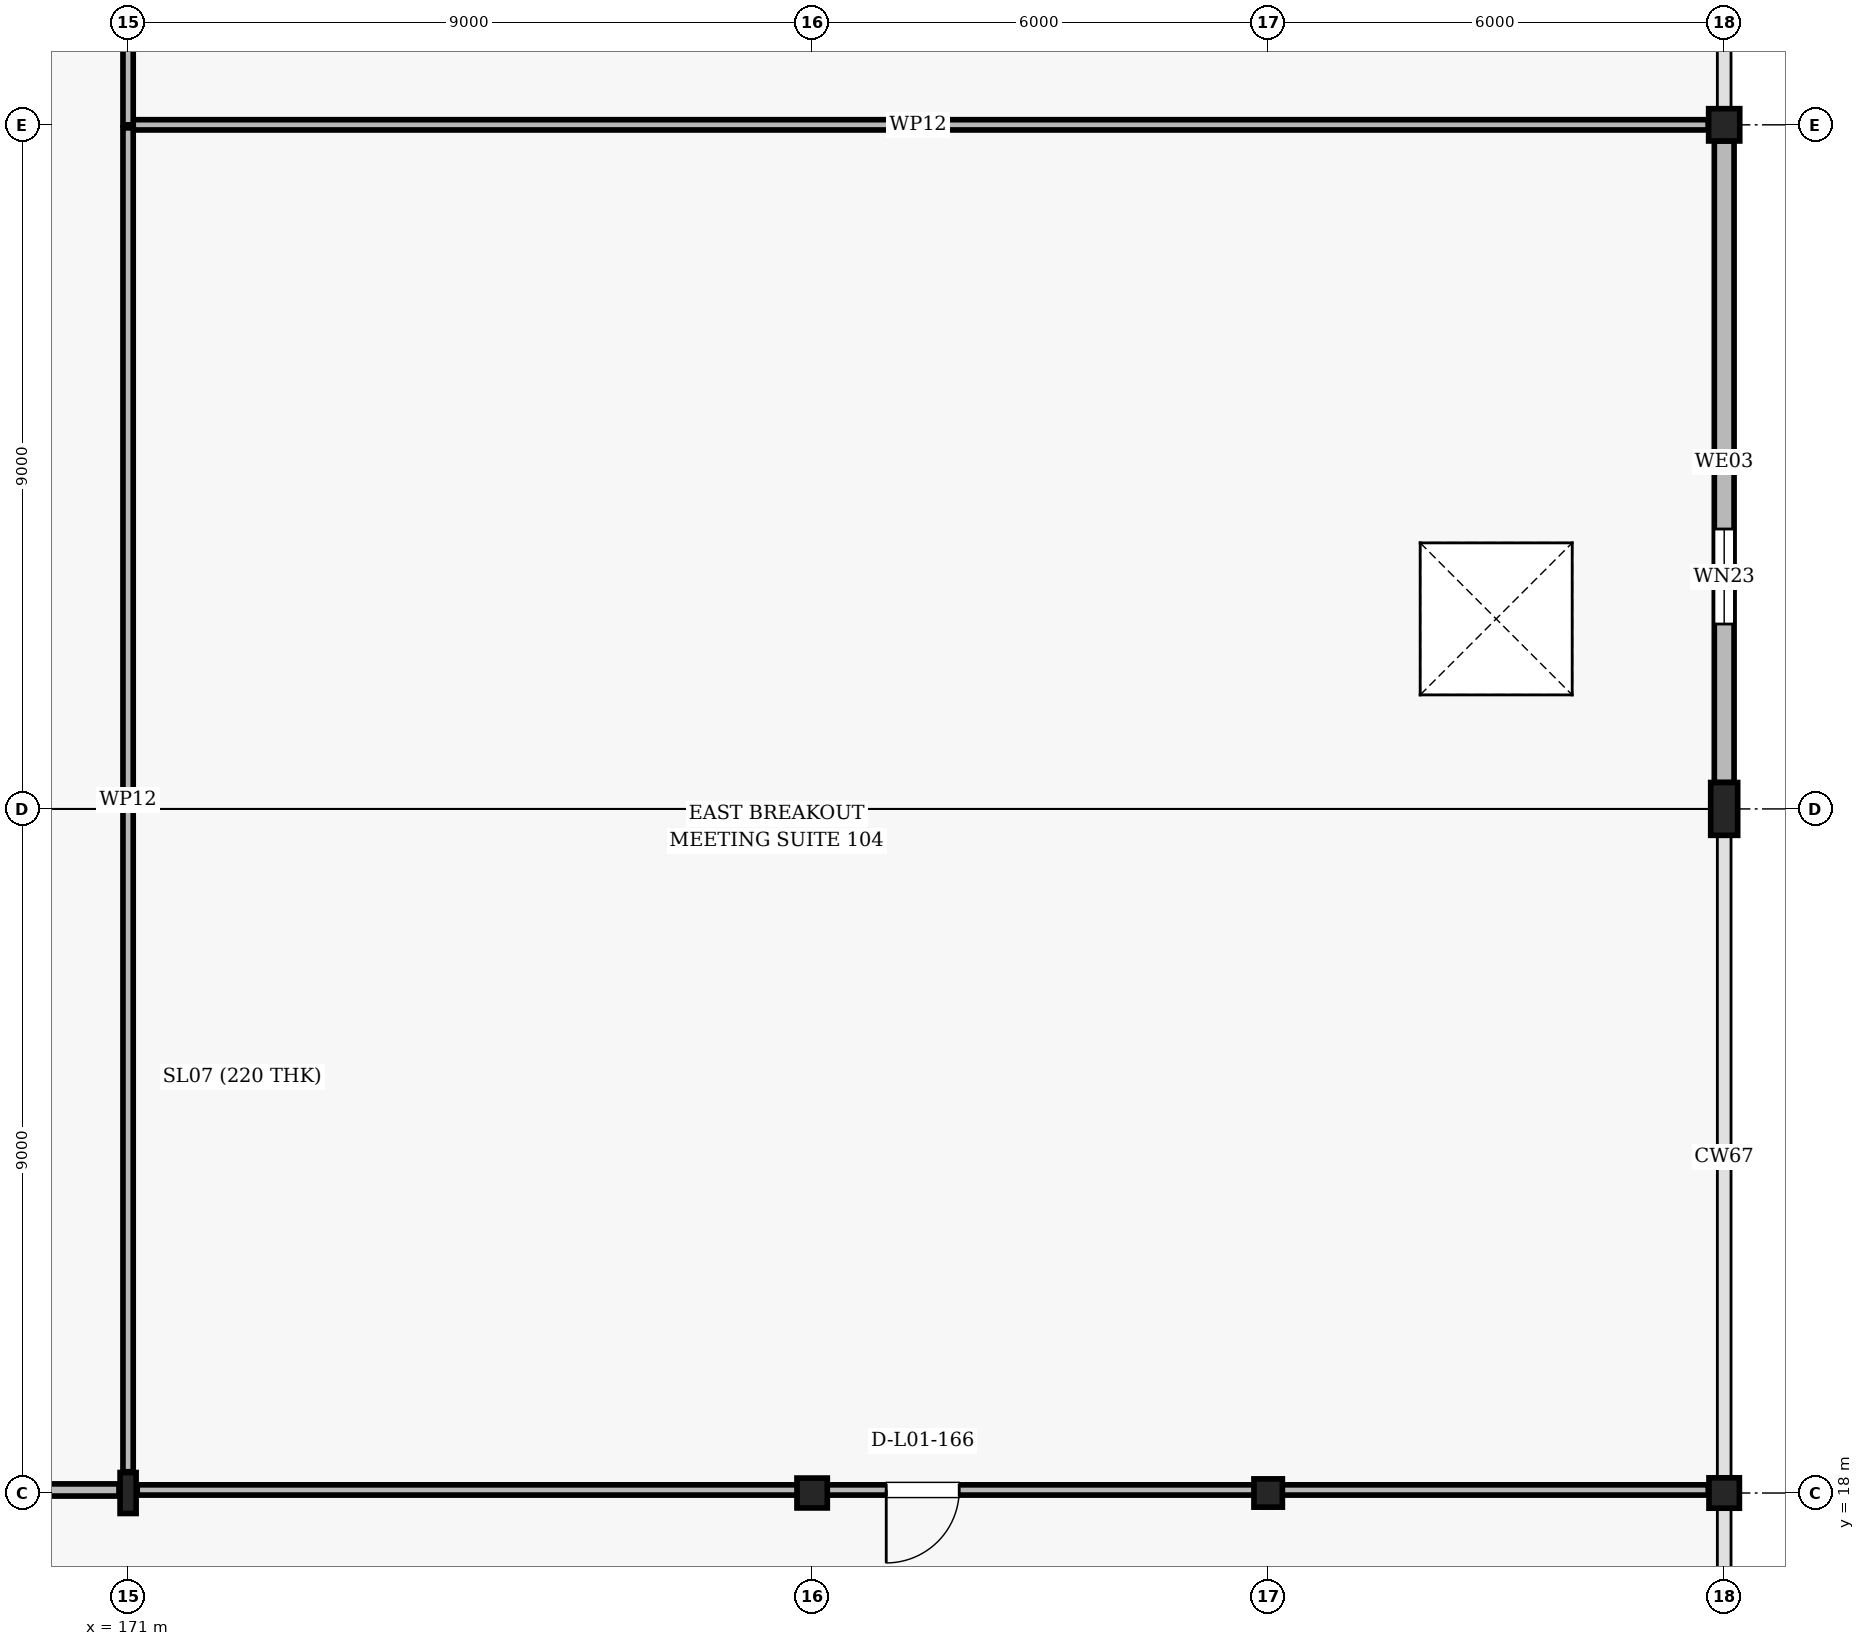
"""IFC4 building model, lengths in metres.
Left out: names, types, materials, properties, quantities, classifications, styles, units other than length and angle.
Written with IfcOpenShell. Run it as: python <this file> out.ifc"""

import sys

from ifc_helpers import new_model, si_unit, direction, frame, frame_2d, origin, origin_2d, place, context, subcontext, project, spatial, rectangle, hollow_rectangle, i_section, extrude, element, fill, save


model = new_model("IFC4")
c1 = context("Model", 3, precision=1e-05, world=origin(), true_north=direction((0.0, 1.0)))
c2 = subcontext(c1, "Body", "Model", "MODEL_VIEW")
j1 = project(units=[si_unit("LENGTHUNIT", "METRE"), si_unit("PLANEANGLEUNIT", "RADIAN")], contexts=[c1])
p1 = place(None, origin())
s1 = spatial("IfcSite", under=j1, at=p1, CompositionType="ELEMENT")
p2 = place(p1, origin())
s2 = spatial("IfcBuilding", under=s1, at=p2, CompositionType="ELEMENT")
p3 = place(p2, frame((0.0, 0.0, 5.4)))
s3 = spatial("IfcBuildingStorey", under=s2, at=p3, CompositionType="ELEMENT", Elevation=5.4)
p4 = place(p3, frame((171.0, 18.0, 0.0), z_axis=(0.0, 0.0, 1.0), x_axis=(1.0, 0.0, 0.0)))
e1 = element("IfcColumn", 1, at=p4, inside=s3, PredefinedType="COLUMN", context=c2, shape_type="SweptSolid", body=[
    extrude(i_section(OverallWidth=0.211, OverallDepth=0.539, WebThickness=0.012, FlangeThickness=0.019, FilletRadius=0.014, at=origin_2d()), origin(), (0.0, 0.0, 1.0), 5.4),
])
p5 = place(p3, frame((180.0, 18.0, 0.0), z_axis=(0.0, 0.0, 1.0), x_axis=(1.0, 0.0, 0.0)))
e2 = element("IfcColumn", 2, at=p5, inside=s3, PredefinedType="COLUMN", context=c2, shape_type="SweptSolid", body=[
    extrude(i_section(OverallWidth=0.399, OverallDepth=0.393, WebThickness=0.023, FlangeThickness=0.037, FilletRadius=0.018, at=origin_2d()), origin(), (0.0, 0.0, 1.0), 5.4),
])
p6 = place(p3, frame((186.0, 18.0, 0.0), z_axis=(0.0, 0.0, 1.0), x_axis=(1.0, 0.0, 0.0)))
e3 = element("IfcColumn", 3, at=p6, inside=s3, PredefinedType="COLUMN", context=c2, shape_type="SweptSolid", body=[
    extrude(i_section(OverallWidth=0.374, OverallDepth=0.372, WebThickness=0.016, FlangeThickness=0.026, FilletRadius=0.016, at=origin_2d()), origin(), (0.0, 0.0, 1.0), 5.4),
])
p7 = place(p3, frame((192.0, 18.0, 0.0), z_axis=(0.0, 0.0, 1.0), x_axis=(1.0, 0.0, 0.0)))
e4 = element("IfcColumn", 4, at=p7, inside=s3, PredefinedType="COLUMN", context=c2, shape_type="SweptSolid", body=[
    extrude(hollow_rectangle(XDim=0.4, YDim=0.4, WallThickness=0.016, InnerFilletRadius=0.016, OuterFilletRadius=0.032, at=origin_2d()), origin(), (0.0, 0.0, 1.0), 5.4),
])
p8 = place(p3, frame((192.0, 27.0, 0.0), z_axis=(0.0, 0.0, 1.0), x_axis=(1.0, 0.0, 0.0)))
e5 = element("IfcColumn", 5, at=p8, inside=s3, PredefinedType="COLUMN", context=c2, shape_type="SweptSolid", body=[
    extrude(i_section(OverallWidth=0.355, OverallDepth=0.695, WebThickness=0.015, FlangeThickness=0.025, FilletRadius=0.018, at=origin_2d()), origin(), (0.0, 0.0, 1.0), 5.4),
])
p9 = place(p3, frame((192.0, 36.0, 0.0), z_axis=(0.0, 0.0, 1.0), x_axis=(1.0, 0.0, 0.0)))
e6 = element("IfcColumn", 6, at=p9, inside=s3, PredefinedType="COLUMN", context=c2, shape_type="SweptSolid", body=[
    extrude(i_section(OverallWidth=0.409, OverallDepth=0.425, WebThickness=0.031, FlangeThickness=0.049, FilletRadius=0.02, at=origin_2d()), origin(), (0.0, 0.0, 1.0), 5.4),
])
p10 = place(p3, frame((192.0, 35.788, 0.0), z_axis=(0.0, 0.0, 1.0), x_axis=(0.0, -1.0, 0.0)))
e7 = element("IfcWall", 7, at=p10, inside=s3, PredefinedType="SOLIDWALL", context=c2, shape_type="SweptSolid", body=[
    extrude(rectangle(XDim=8.44, YDim=0.26, at=frame_2d((4.22, 0.0))), origin(), (0.0, 0.0, 1.0), 4.825),
])
p11 = place(p10, frame((5.105, 0.0, 0.95)))
e8 = element("IfcOpeningElement", 8, at=p11, cuts=e7, PredefinedType="OPENING", context=c2, shape_type="SweptSolid", body=[
    extrude(rectangle(XDim=1.25, YDim=1.55, at=frame_2d((0.625, 0.775))), frame((0.0, 0.14, 0.0), z_axis=(0.0, -1.0, 0.0), x_axis=(1.0, 0.0, 0.0)), (0.0, 0.0, 1.0), 0.28),
])
p12 = place(p3, frame((191.79, 36.0, 0.0), z_axis=(0.0, 0.0, 1.0), x_axis=(-1.0, 0.0, 0.0)))
e9 = element("IfcWall", 9, at=p12, inside=s3, PredefinedType="PARTITIONING", context=c2, shape_type="SweptSolid", body=[
    extrude(rectangle(XDim=20.79, YDim=0.135, at=frame_2d((10.395, 0.0))), origin(), (0.0, 0.0, 1.0), 3.125),
])
p13 = place(p3, frame((171.0, 36.0, 0.0), z_axis=(0.0, 0.0, 1.0), x_axis=(0.0, 1.0, 0.0)))
e10 = element("IfcWall", 10, at=p13, inside=s3, PredefinedType="PARTITIONING", context=c2, shape_type="SweptSolid", body=[
    extrude(rectangle(XDim=16.31, YDim=0.135, at=frame_2d((8.155, 0.0))), origin(), (0.0, 0.0, 1.0), 3.125),
])
p14 = place(p3, frame((191.79, 18.04, 0.0), z_axis=(0.0, 0.0, 1.0), x_axis=(-1.0, 0.0, 0.0)))
e11 = element("IfcWall", 11, at=p14, inside=s3, PredefinedType="PARTITIONING", context=c2, shape_type="SweptSolid", body=[
    extrude(rectangle(XDim=20.67, YDim=0.135, at=frame_2d((10.335, 0.0))), origin(), (0.0, 0.0, 1.0), 4.27),
])
p15 = place(p14, frame((9.855, 0.0, 0.0)))
e12 = element("IfcOpeningElement", 12, at=p15, cuts=e11, PredefinedType="OPENING", context=c2, shape_type="SweptSolid", body=[
    extrude(rectangle(XDim=0.96, YDim=2.15, at=frame_2d((0.48, 1.075))), frame((0.0, 0.078, 0.0), z_axis=(0.0, -1.0, 0.0), x_axis=(1.0, 0.0, 0.0)), (0.0, 0.0, 1.0), 0.155),
])
p16 = place(p3, frame((171.0, 18.28, 0.0), z_axis=(0.0, 0.0, 1.0), x_axis=(0.0, 1.0, 0.0)))
e13 = element("IfcWall", 13, at=p16, inside=s3, PredefinedType="PARTITIONING", context=c2, shape_type="SweptSolid", body=[
    extrude(rectangle(XDim=17.68, YDim=0.135, at=frame_2d((8.84, 0.0))), origin(), (0.0, 0.0, 1.0), 3.125),
])
p17 = place(p3, frame((170.88, 18.04, 0.0), z_axis=(0.0, 0.0, 1.0), x_axis=(-1.0, 0.0, 0.0)))
e14 = element("IfcWall", 14, at=p17, inside=s3, PredefinedType="PARTITIONING", context=c2, shape_type="SweptSolid", body=[
    extrude(rectangle(XDim=15.84, YDim=0.16, at=frame_2d((7.92, 0.0))), origin(), (0.0, 0.0, 1.0), 4.27),
])
p18 = place(p11, origin())
e15 = element("IfcWindow", 15, at=p18, inside=s3, PartitioningType="SINGLE_PANEL", PredefinedType="WINDOW", context=c2, shape_type="SweptSolid", body=[
    extrude(rectangle(XDim=1.25, YDim=1.55, at=frame_2d((0.625, 0.775))), frame((0.0, 0.03, 0.0), z_axis=(0.0, -1.0, 0.0), x_axis=(1.0, 0.0, 0.0)), (0.0, 0.0, 1.0), 0.06),
])
fill(e8, e15)
p19 = place(p15, origin())
e16 = element("IfcDoor", 16, at=p19, inside=s3, OperationType="SINGLE_SWING_RIGHT", PredefinedType="DOOR", context=c2, shape_type="SweptSolid", body=[
    extrude(rectangle(XDim=0.96, YDim=2.15, at=frame_2d((0.48, 1.075))), frame((0.0, 0.025, 0.0), z_axis=(0.0, -1.0, 0.0), x_axis=(1.0, 0.0, 0.0)), (0.0, 0.0, 1.0), 0.05),
])
fill(e12, e16)
save(model, sys.argv[1])
